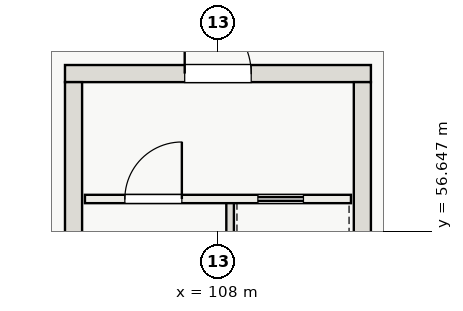
"""IFC4 building model, lengths in metres.
Left out: names, types, materials, properties, quantities, classifications, styles, units other than length and angle.
Written with IfcOpenShell. Run it as: python <this file> out.ifc"""

import sys

from ifc_helpers import new_model, si_unit, direction, frame, frame_2d, origin, place, context, subcontext, project, spatial, rectangle, extrude, element, fill, save


model = new_model("IFC4")
c1 = context("Model", 3, precision=1e-05, world=origin(), true_north=direction((0.0, 1.0)))
c2 = subcontext(c1, "Body", "Model", "MODEL_VIEW")
j1 = project(units=[si_unit("LENGTHUNIT", "METRE"), si_unit("PLANEANGLEUNIT", "RADIAN")], contexts=[c1])
p1 = place(None, origin())
s1 = spatial("IfcSite", under=j1, at=p1, CompositionType="ELEMENT")
p2 = place(p1, origin())
s2 = spatial("IfcBuilding", under=s1, at=p2, CompositionType="ELEMENT")
p3 = place(p2, origin())
s3 = spatial("IfcBuildingStorey", under=s2, at=p3, CompositionType="ELEMENT", Elevation=0.0)
p4 = place(p3, frame((103.975, 60.8, 0.0), z_axis=(0.0, 0.0, 1.0), x_axis=(1.0, 0.0, 0.0)))
e1 = element("IfcWall", 1, at=p4, inside=s3, PredefinedType="SHEAR", context=c2, shape_type="SweptSolid", body=[
    extrude(rectangle(XDim=8.05, YDim=0.45, at=frame_2d((4.025, 0.0))), origin(), (0.0, 0.0, 1.0), 6.0),
])
p5 = place(p4, frame((3.15, 0.0, 0.0)))
e2 = element("IfcOpeningElement", 2, at=p5, cuts=e1, PredefinedType="OPENING", context=c2, shape_type="SweptSolid", body=[
    extrude(rectangle(XDim=1.75, YDim=2.3, at=frame_2d((0.875, 1.15))), frame((0.0, 0.235, 0.0), z_axis=(0.0, -1.0, 0.0), x_axis=(1.0, 0.0, 0.0)), (0.0, 0.0, 1.0), 0.47),
])
for number, where, z_axis, x_axis in (
    (3, (104.2, 49.425, 0.0), (0.0, 0.0, 1.0), (0.0, 1.0, 0.0)),
    (4, (111.8, 49.425, 0.0), (0.0, 0.0, 1.0), (0.0, 1.0, 0.0)),
):
    element("IfcWall", number, at=place(p3, frame(where, z_axis=z_axis, x_axis=x_axis)), inside=s3, PredefinedType="SHEAR", context=c2, shape_type="SweptSolid", body=[
        extrude(rectangle(XDim=11.15, YDim=0.45, at=frame_2d((5.575, 0.0))), origin(), (0.0, 0.0, 1.0), 6.0),
    ])
p6 = place(p3, frame((108.32, 49.45, 0.0), z_axis=(0.0, 0.0, 1.0), x_axis=(0.0, 1.0, 0.0)))
e5 = element("IfcWall", 5, at=p6, inside=s3, PredefinedType="SOLIDWALL", context=c2, shape_type="SweptSolid", body=[
    extrude(rectangle(XDim=8.0, YDim=0.2, at=frame_2d((4.0, 0.0))), origin(), (0.0, 0.0, 1.0), 6.0),
])
p7 = place(p3, frame((104.5, 57.5, 0.0), z_axis=(0.0, 0.0, 1.0), x_axis=(1.0, 0.0, 0.0)))
e6 = element("IfcWall", 6, at=p7, inside=s3, PredefinedType="SOLIDWALL", context=c2, shape_type="SweptSolid", body=[
    extrude(rectangle(XDim=7.0, YDim=0.22, at=frame_2d((3.5, 0.0))), origin(), (0.0, 0.0, 1.0), 5.68),
])
p8 = place(p7, frame((1.05, 0.0, 0.0)))
e7 = element("IfcOpeningElement", 7, at=p8, cuts=e6, PredefinedType="OPENING", context=c2, shape_type="SweptSolid", body=[
    extrude(rectangle(XDim=1.5, YDim=2.2, at=frame_2d((0.75, 1.1))), frame((0.0, 0.12, 0.0), z_axis=(0.0, -1.0, 0.0), x_axis=(1.0, 0.0, 0.0)), (0.0, 0.0, 1.0), 0.24),
])
p9 = place(p7, frame((4.55, 0.0, 0.0)))
e8 = element("IfcOpeningElement", 8, at=p9, cuts=e6, PredefinedType="OPENING", context=c2, shape_type="SweptSolid", body=[
    extrude(rectangle(XDim=1.2, YDim=2.2, at=frame_2d((0.6, 1.1))), frame((0.0, 0.12, 0.0), z_axis=(0.0, -1.0, 0.0), x_axis=(1.0, 0.0, 0.0)), (0.0, 0.0, 1.0), 0.24),
])
p10 = place(p8, origin())
e9 = element("IfcDoor", 9, at=p10, inside=s3, OperationType="SINGLE_SWING_RIGHT", PredefinedType="DOOR", context=c2, shape_type="SweptSolid", body=[
    extrude(rectangle(XDim=1.5, YDim=2.2, at=frame_2d((0.75, 1.1))), frame((0.0, 0.025, 0.0), z_axis=(0.0, -1.0, 0.0), x_axis=(1.0, 0.0, 0.0)), (0.0, 0.0, 1.0), 0.05),
])
fill(e7, e9)
p11 = place(p9, origin())
e10 = element("IfcDoor", 10, at=p11, inside=s3, OperationType="SLIDING_TO_RIGHT", PredefinedType="DOOR", context=c2, shape_type="SweptSolid", body=[
    extrude(rectangle(XDim=1.2, YDim=2.2, at=frame_2d((0.6, 1.1))), frame((0.0, 0.025, 0.0), z_axis=(0.0, -1.0, 0.0), x_axis=(1.0, 0.0, 0.0)), (0.0, 0.0, 1.0), 0.05),
])
fill(e8, e10)
p12 = place(p5, origin())
e11 = element("IfcDoor", 11, at=p12, inside=s3, OperationType="DOUBLE_DOOR_SINGLE_SWING", PredefinedType="DOOR", context=c2, shape_type="SweptSolid", body=[
    extrude(rectangle(XDim=1.75, YDim=2.3, at=frame_2d((0.875, 1.15))), frame((0.0, 0.025, 0.0), z_axis=(0.0, -1.0, 0.0), x_axis=(1.0, 0.0, 0.0)), (0.0, 0.0, 1.0), 0.05),
])
fill(e2, e11)
save(model, sys.argv[1])
